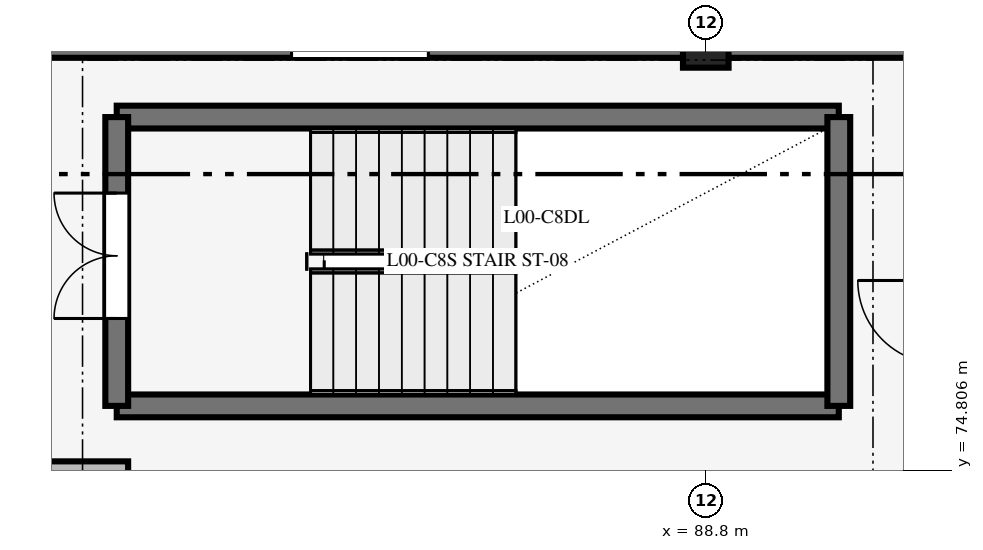
"""IFC4 building model, lengths in metres.
Left out: names, types, materials, properties, quantities, classifications, styles, units other than length and angle.
Written with IfcOpenShell. Run it as: python <this file> out.ifc"""

import sys

from ifc_helpers import new_model, si_unit, direction, frame, frame_2d, origin, origin_2d, place, context, subcontext, project, spatial, rectangle, extrude, element, fill, save


model = new_model("IFC4")
c1 = context("Model", 3, precision=1e-05, world=origin(), true_north=direction((0.0, 1.0)))
c2 = subcontext(c1, "Body", "Model", "MODEL_VIEW")
j1 = project(units=[si_unit("LENGTHUNIT", "METRE"), si_unit("PLANEANGLEUNIT", "RADIAN")], contexts=[c1])
p1 = place(None, origin())
s1 = spatial("IfcSite", under=j1, at=p1, CompositionType="ELEMENT")
p2 = place(p1, origin())
s2 = spatial("IfcBuilding", under=s1, at=p2, CompositionType="ELEMENT")
p3 = place(p2, origin())
s3 = spatial("IfcBuildingStorey", under=s2, at=p3, CompositionType="ELEMENT", Elevation=0.0)
p4 = place(p3, frame((88.8, 80.4, 0.0), z_axis=(0.0, 0.0, 1.0), x_axis=(1.0, 0.0, 0.0)))
e1 = element("IfcColumn", 1, at=p4, inside=s3, PredefinedType="COLUMN", context=c2, shape_type="SweptSolid", body=[
    extrude(rectangle(XDim=0.6, YDim=0.6, at=origin_2d()), origin(), (0.0, 0.0, 1.0), 6.0),
])
for number, where, z_axis, x_axis in (
    (2, (90.55, 75.65, 0.0), (0.0, 0.0, 1.0), (-1.0, 0.0, 0.0)),
    (3, (81.05, 79.45, 0.0), (0.0, 0.0, 1.0), (1.0, 0.0, 0.0)),
):
    element("IfcWall", number, at=place(p3, frame(where, z_axis=z_axis, x_axis=x_axis)), inside=s3, PredefinedType="SHEAR", context=c2, shape_type="SweptSolid", body=[
        extrude(rectangle(XDim=9.5, YDim=0.3, at=frame_2d((4.75, 0.0))), origin(), (0.0, 0.0, 1.0), 6.0),
    ])
p5 = place(p3, frame((81.05, 75.65, 0.0), z_axis=(0.0, 0.0, 1.0), x_axis=(0.0, 1.0, 0.0)))
e4 = element("IfcWall", 4, at=p5, inside=s3, PredefinedType="SHEAR", context=c2, shape_type="SweptSolid", body=[
    extrude(rectangle(XDim=3.8, YDim=0.3, at=frame_2d((1.9, 0.0))), origin(), (0.0, 0.0, 1.0), 6.0),
])
p6 = place(p5, frame((1.15, 0.0, 0.0)))
e5 = element("IfcOpeningElement", 5, at=p6, cuts=e4, PredefinedType="OPENING", context=c2, shape_type="SweptSolid", body=[
    extrude(rectangle(XDim=1.65, YDim=2.2, at=frame_2d((0.825, 1.1))), frame((0.0, 0.16, 0.0), z_axis=(0.0, -1.0, 0.0), x_axis=(1.0, 0.0, 0.0)), (0.0, 0.0, 1.0), 0.32),
])
p7 = place(p3, frame((90.55, 75.65, 0.0), z_axis=(0.0, 0.0, 1.0), x_axis=(0.0, 1.0, 0.0)))
e6 = element("IfcWall", 6, at=p7, inside=s3, PredefinedType="SHEAR", context=c2, shape_type="SweptSolid", body=[
    extrude(rectangle(XDim=3.8, YDim=0.3, at=frame_2d((1.9, 0.0))), origin(), (0.0, 0.0, 1.0), 6.0),
])
p8 = place(p3, frame((80.09, 80.4, 0.0), z_axis=(0.0, 0.0, 1.0), x_axis=(1.0, 0.0, 0.0)))
e7 = element("IfcWall", 7, at=p8, inside=s3, PredefinedType="STANDARD", context=c2, shape_type="SweptSolid", body=[
    extrude(rectangle(XDim=8.42, YDim=0.34, at=frame_2d((4.21, 0.0))), origin(), (0.0, 0.0, 1.0), 5.76),
])
p9 = place(p8, frame((3.26, 0.0, 0.0)))
e8 = element("IfcOpeningElement", 8, at=p9, cuts=e7, PredefinedType="OPENING", context=c2, shape_type="SweptSolid", body=[
    extrude(rectangle(XDim=1.8, YDim=2.25, at=frame_2d((0.9, 1.125))), frame((0.0, 0.18, 0.0), z_axis=(0.0, -1.0, 0.0), x_axis=(1.0, 0.0, 0.0)), (0.0, 0.0, 1.0), 0.36),
])
p10 = place(p3, frame((89.09, 80.4, 0.0), z_axis=(0.0, 0.0, 1.0), x_axis=(1.0, 0.0, 0.0)))
e9 = element("IfcWall", 9, at=p10, inside=s3, PredefinedType="STANDARD", context=c2, shape_type="SweptSolid", body=[
    extrude(rectangle(XDim=8.42, YDim=0.34, at=frame_2d((4.21, 0.0))), origin(), (0.0, 0.0, 1.0), 5.76),
])
p11 = place(p10, frame((3.36, 0.0, 1.2)))
e10 = element("IfcOpeningElement", 10, at=p11, cuts=e9, PredefinedType="OPENING", context=c2, shape_type="SweptSolid", body=[
    extrude(rectangle(XDim=1.5, YDim=1.6, at=frame_2d((0.75, 0.8))), frame((0.0, 0.18, 0.0), z_axis=(0.0, -1.0, 0.0), x_axis=(1.0, 0.0, 0.0)), (0.0, 0.0, 1.0), 0.36),
])
p12 = place(p3, frame((79.95, 74.8, 0.0), z_axis=(0.0, 0.0, 1.0), x_axis=(1.0, 0.0, 0.0)))
e11 = element("IfcWall", 11, at=p12, inside=s3, PredefinedType="STANDARD", context=c2, shape_type="SweptSolid", body=[
    extrude(rectangle(XDim=1.25, YDim=0.24, at=frame_2d((0.625, 0.0))), origin(), (0.0, 0.0, 1.0), 3.05),
])
p13 = place(p6, origin())
e12 = element("IfcDoor", 12, at=p13, inside=s3, OperationType="DOUBLE_DOOR_SINGLE_SWING", PredefinedType="DOOR", context=c2, shape_type="SweptSolid", body=[
    extrude(rectangle(XDim=1.65, YDim=2.2, at=frame_2d((0.825, 1.1))), frame((0.0, 0.025, 0.0), z_axis=(0.0, -1.0, 0.0), x_axis=(1.0, 0.0, 0.0)), (0.0, 0.0, 1.0), 0.05),
])
fill(e5, e12)
save(model, sys.argv[1])
